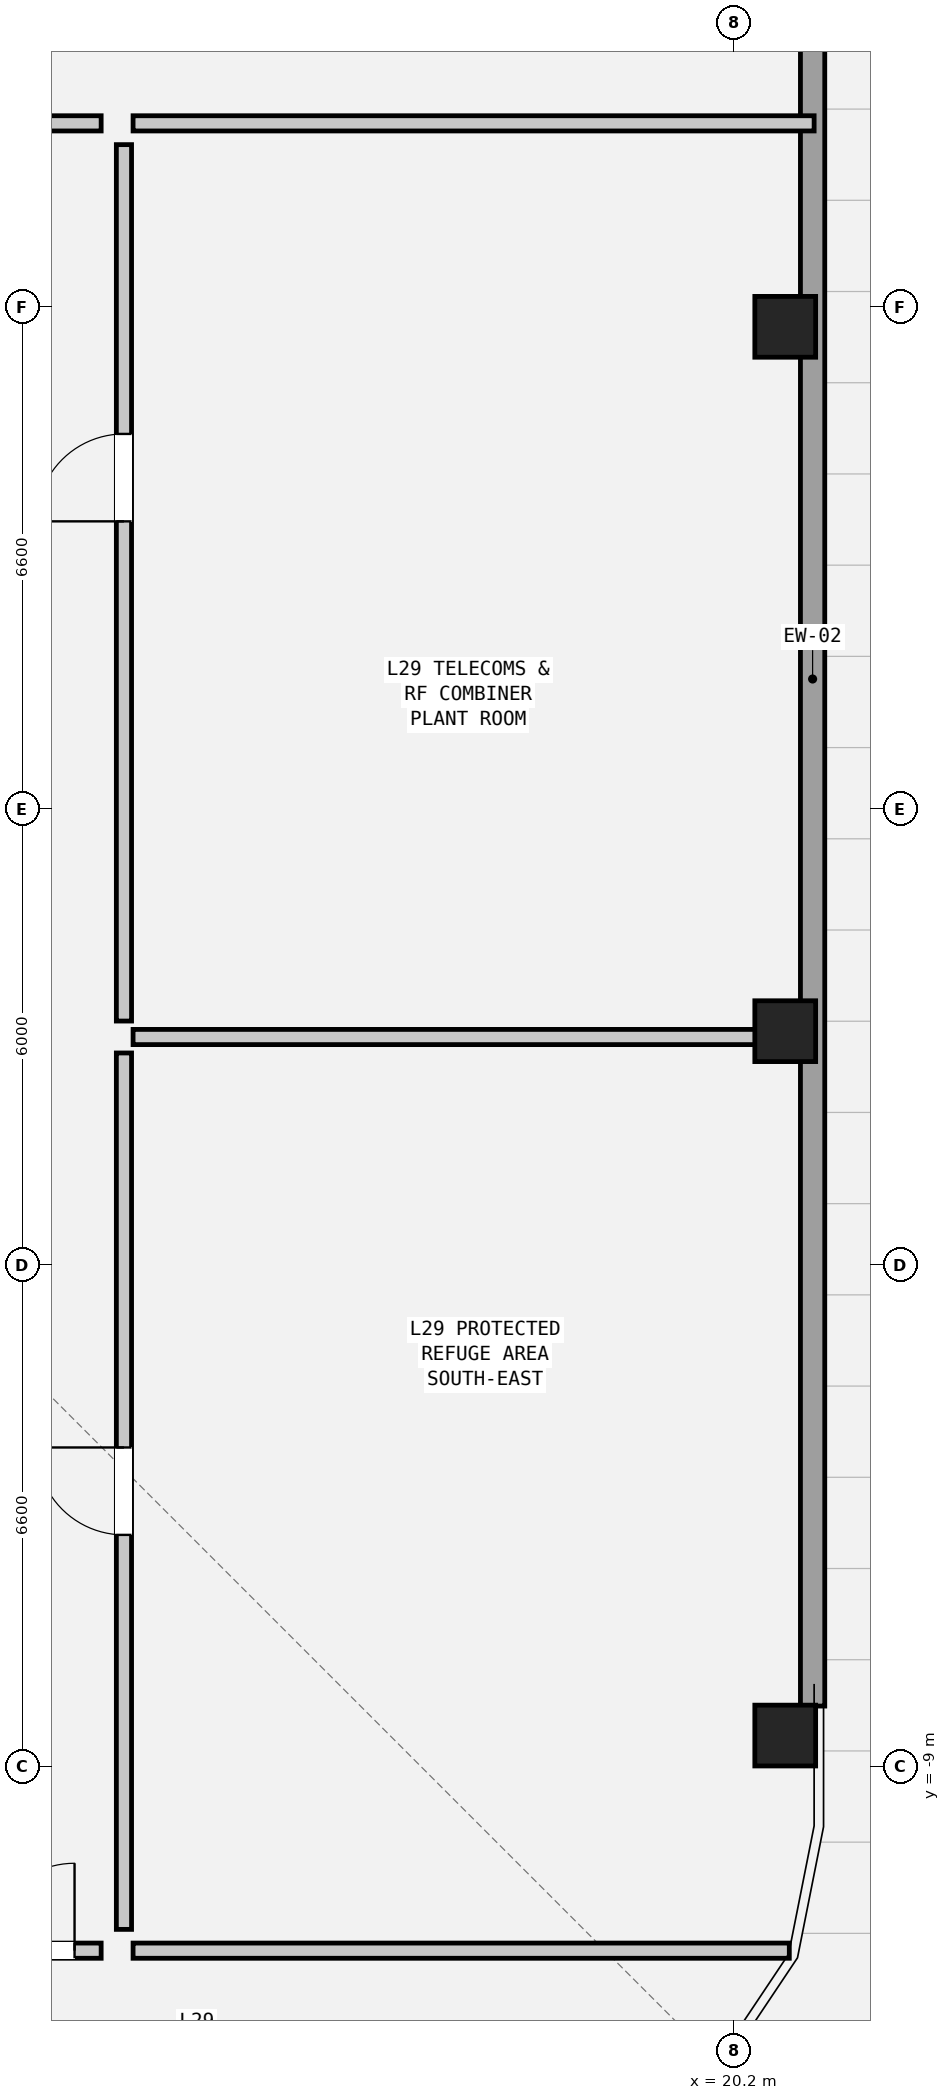
"""IFC4 building model, lengths in metres.
Left out: names, types, materials, properties, quantities, classifications, styles, units other than length and angle.
Written with IfcOpenShell. Run it as: python <this file> out.ifc"""

import sys

from ifc_helpers import new_model, si_unit, direction, frame, frame_2d, origin, origin_2d, place, context, subcontext, project, spatial, rectangle, hollow_rectangle, extrude, element, fill, save


model = new_model("IFC4")
c1 = context("Model", 3, precision=1e-05, world=origin(), true_north=direction((0.0, 1.0)))
c2 = subcontext(c1, "Body", "Model", "MODEL_VIEW")
j1 = project(units=[si_unit("LENGTHUNIT", "METRE"), si_unit("PLANEANGLEUNIT", "RADIAN")], contexts=[c1])
p1 = place(None, origin())
s1 = spatial("IfcSite", under=j1, at=p1, CompositionType="ELEMENT")
p2 = place(p1, origin())
s2 = spatial("IfcBuilding", under=s1, at=p2, CompositionType="ELEMENT")
p3 = place(p2, frame((0.0, 0.0, 101.25)))
s3 = spatial("IfcBuildingStorey", under=s2, at=p3, CompositionType="ELEMENT", Elevation=101.25)
for number, where, z_axis, x_axis in (
    (1, (20.87, -8.59, 0.0), (0.0, 0.0, 1.0), (0.0, 1.0, 0.0)),
    (2, (20.87, 0.677, 0.0), (0.0, 0.0, 1.0), (0.0, 1.0, 0.0)),
    (3, (20.87, 9.943, 0.0), (0.0, 0.0, 1.0), (0.0, 1.0, 0.0)),
):
    element("IfcColumn", number, at=place(p3, frame(where, z_axis=z_axis, x_axis=x_axis)), inside=s3, PredefinedType="COLUMN", context=c2, shape_type="SweptSolid", body=[
        extrude(hollow_rectangle(XDim=0.8, YDim=0.8, WallThickness=0.05, at=origin_2d()), origin(), (0.0, 0.0, 1.0), 3.6),
    ])
p4 = place(p3, frame((21.23, 18.822, 0.0), z_axis=(0.0, 0.0, 1.0), x_axis=(0.0, -1.0, 0.0)))
e4 = element("IfcWall", 4, at=p4, inside=s3, PredefinedType="SOLIDWALL", context=c2, shape_type="SweptSolid", body=[
    extrude(rectangle(XDim=27.024, YDim=0.32, at=frame_2d((13.512, 0.0))), origin(), (0.0, 0.0, 1.0), 2.082),
])
p5 = place(p3, frame((5.98, 12.62, 0.0), z_axis=(0.0, 0.0, 1.0), x_axis=(1.0, 0.0, 0.0)))
e5 = element("IfcWall", 5, at=p5, inside=s3, PredefinedType="PARTITIONING", context=c2, shape_type="SweptSolid", body=[
    extrude(rectangle(XDim=5.89, YDim=0.2, at=frame_2d((2.945, 0.0))), origin(), (0.0, 0.0, 1.0), 3.22),
])
p6 = place(p5, frame((1.77, 0.0, 0.0)))
e6 = element("IfcOpeningElement", 6, at=p6, cuts=e5, PredefinedType="OPENING", context=c2, shape_type="SweptSolid", body=[
    extrude(rectangle(XDim=1.15, YDim=2.1, at=frame_2d((0.575, 1.05))), frame((0.0, 0.112, 0.0), z_axis=(0.0, -1.0, 0.0), x_axis=(1.0, 0.0, 0.0)), (0.0, 0.0, 1.0), 0.224),
])
p7 = place(p3, frame((5.98, -11.42, 0.0), z_axis=(0.0, 0.0, 1.0), x_axis=(1.0, 0.0, 0.0)))
e7 = element("IfcWall", 7, at=p7, inside=s3, PredefinedType="PARTITIONING", context=c2, shape_type="SweptSolid", body=[
    extrude(rectangle(XDim=5.89, YDim=0.2, at=frame_2d((2.945, 0.0))), origin(), (0.0, 0.0, 1.0), 2.741),
])
p8 = place(p7, frame((4.39, 0.0, 0.0)))
e8 = element("IfcOpeningElement", 8, at=p8, cuts=e7, PredefinedType="OPENING", context=c2, shape_type="SweptSolid", body=[
    extrude(rectangle(XDim=1.15, YDim=2.1, at=frame_2d((0.575, 1.05))), frame((0.0, 0.112, 0.0), z_axis=(0.0, -1.0, 0.0), x_axis=(1.0, 0.0, 0.0)), (0.0, 0.0, 1.0), 0.224),
])
p9 = place(p3, frame((12.29, 12.62, 0.0), z_axis=(0.0, 0.0, 1.0), x_axis=(1.0, 0.0, 0.0)))
e9 = element("IfcWall", 9, at=p9, inside=s3, PredefinedType="PARTITIONING", context=c2, shape_type="SweptSolid", body=[
    extrude(rectangle(XDim=8.96, YDim=0.2, at=frame_2d((4.48, 0.0))), origin(), (0.0, 0.0, 1.0), 3.22),
])
p10 = place(p3, frame((12.29, -11.42, 0.0), z_axis=(0.0, 0.0, 1.0), x_axis=(1.0, 0.0, 0.0)))
e10 = element("IfcWall", 10, at=p10, inside=s3, PredefinedType="PARTITIONING", context=c2, shape_type="SweptSolid", body=[
    extrude(rectangle(XDim=8.634, YDim=0.2, at=frame_2d((4.317, 0.0))), origin(), (0.0, 0.0, 1.0), 2.741),
])
p11 = place(p3, frame((12.29, 0.6, 0.0), z_axis=(0.0, 0.0, 1.0), x_axis=(1.0, 0.0, 0.0)))
e11 = element("IfcWall", 11, at=p11, inside=s3, PredefinedType="PARTITIONING", context=c2, shape_type="SweptSolid", body=[
    extrude(rectangle(XDim=8.96, YDim=0.2, at=frame_2d((4.48, 0.0))), origin(), (0.0, 0.0, 1.0), 2.741),
])
p12 = place(p3, frame((12.17, -11.14, 0.0), z_axis=(0.0, 0.0, 1.0), x_axis=(0.0, 1.0, 0.0)))
e12 = element("IfcWall", 12, at=p12, inside=s3, PredefinedType="PARTITIONING", context=c2, shape_type="SweptSolid", body=[
    extrude(rectangle(XDim=11.53, YDim=0.2, at=frame_2d((5.765, 0.0))), origin(), (0.0, 0.0, 1.0), 3.22),
])
p13 = place(p12, frame((5.19, 0.0, 0.0)))
e13 = element("IfcOpeningElement", 13, at=p13, cuts=e12, PredefinedType="OPENING", context=c2, shape_type="SweptSolid", body=[
    extrude(rectangle(XDim=1.15, YDim=2.1, at=frame_2d((0.575, 1.05))), frame((0.0, 0.112, 0.0), z_axis=(0.0, -1.0, 0.0), x_axis=(1.0, 0.0, 0.0)), (0.0, 0.0, 1.0), 0.224),
])
p14 = place(p3, frame((12.17, 0.81, 0.0), z_axis=(0.0, 0.0, 1.0), x_axis=(0.0, 1.0, 0.0)))
e14 = element("IfcWall", 14, at=p14, inside=s3, PredefinedType="PARTITIONING", context=c2, shape_type="SweptSolid", body=[
    extrude(rectangle(XDim=11.53, YDim=0.2, at=frame_2d((5.765, 0.0))), origin(), (0.0, 0.0, 1.0), 3.22),
])
p15 = place(p14, frame((6.574, 0.0, 0.0)))
e15 = element("IfcOpeningElement", 15, at=p15, cuts=e14, PredefinedType="OPENING", context=c2, shape_type="SweptSolid", body=[
    extrude(rectangle(XDim=1.15, YDim=2.1, at=frame_2d((0.575, 1.05))), frame((0.0, 0.112, 0.0), z_axis=(0.0, -1.0, 0.0), x_axis=(1.0, 0.0, 0.0)), (0.0, 0.0, 1.0), 0.224),
])
p16 = place(p8, origin())
e16 = element("IfcDoor", 16, at=p16, inside=s3, OperationType="SINGLE_SWING_RIGHT", PredefinedType="DOOR", context=c2, shape_type="SweptSolid", body=[
    extrude(rectangle(XDim=1.15, YDim=2.1, at=frame_2d((0.575, 1.05))), frame((0.0, 0.025, 0.0), z_axis=(0.0, -1.0, 0.0), x_axis=(1.0, 0.0, 0.0)), (0.0, 0.0, 1.0), 0.05),
])
fill(e8, e16)
p17 = place(p13, origin())
e17 = element("IfcDoor", 17, at=p17, inside=s3, OperationType="SINGLE_SWING_RIGHT", PredefinedType="DOOR", context=c2, shape_type="SweptSolid", body=[
    extrude(rectangle(XDim=1.15, YDim=2.1, at=frame_2d((0.575, 1.05))), frame((0.0, 0.025, 0.0), z_axis=(0.0, -1.0, 0.0), x_axis=(1.0, 0.0, 0.0)), (0.0, 0.0, 1.0), 0.05),
])
fill(e13, e17)
p18 = place(p15, origin())
e18 = element("IfcDoor", 18, at=p18, inside=s3, OperationType="SINGLE_SWING_LEFT", PredefinedType="DOOR", context=c2, shape_type="SweptSolid", body=[
    extrude(rectangle(XDim=1.15, YDim=2.1, at=frame_2d((0.575, 1.05))), frame((0.0, 0.025, 0.0), z_axis=(0.0, -1.0, 0.0), x_axis=(1.0, 0.0, 0.0)), (0.0, 0.0, 1.0), 0.05),
])
fill(e15, e18)
save(model, sys.argv[1])
